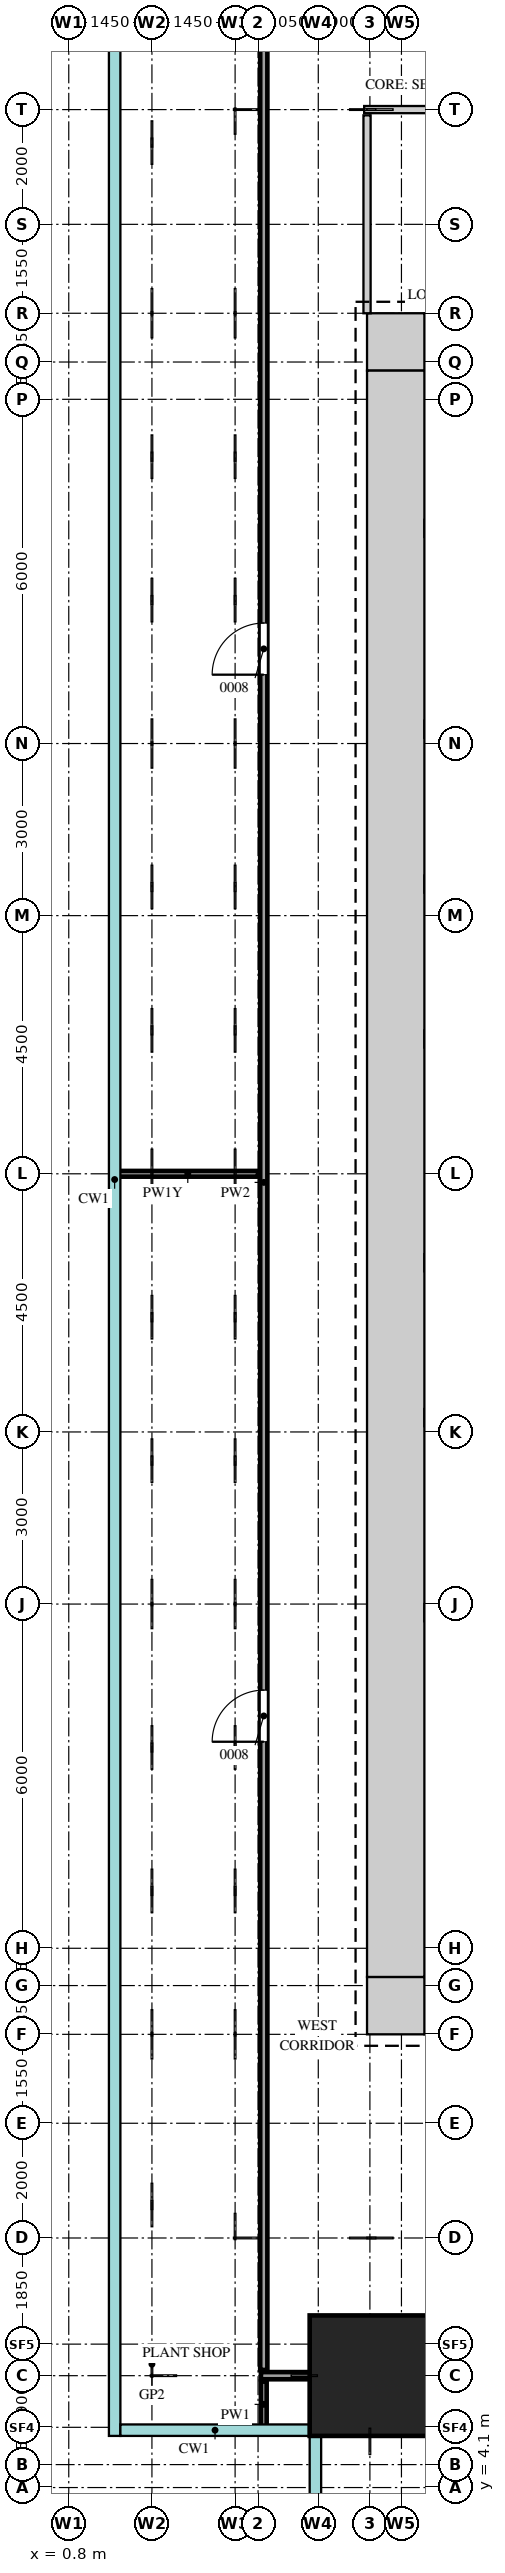
"""IFC4 building model, lengths in metres.
Left out: names, types, materials, properties, quantities, classifications, styles, units other than length and angle.
Written with IfcOpenShell. Run it as: python <this file> out.ifc"""

import sys

from ifc_helpers import new_model, si_unit, direction, frame, frame_2d, origin, origin_2d, place, context, subcontext, project, spatial, rectangle, extrude, source, transform, mapped, element, fill, save


model = new_model("IFC4")
c1 = context("Model", 3, precision=1e-05, world=origin(), true_north=direction((0.0, 1.0)))
c2 = subcontext(c1, "Body", "Model", "MODEL_VIEW")
j1 = project(units=[si_unit("LENGTHUNIT", "METRE"), si_unit("PLANEANGLEUNIT", "RADIAN")], contexts=[c1])
p1 = place(None, origin())
s1 = spatial("IfcSite", under=j1, at=p1, CompositionType="ELEMENT")
p2 = place(p1, origin())
s2 = spatial("IfcBuilding", under=s1, at=p2, CompositionType="ELEMENT")
p3 = place(p2, frame((0.0, 0.0, 158.7)))
s3 = spatial("IfcBuildingStorey", under=s2, at=p3, CompositionType="ELEMENT", Elevation=158.7)
m1 = source(origin(), c2, "Body", "SweptSolid", [
    extrude(rectangle(XDim=1.0, YDim=1.0, at=frame_2d((0.5, 0.0))), origin(), (0.0, 0.0, 1.0), 5.75),
])
for number, where, z_axis, x_axis in (
    (1, (6.0, 41.5, 0.0), (0.0, 0.0, 1.0), (1.0, 0.0, 0.0)),
    (2, (6.0, 12.5, 0.0), (0.0, 0.0, 1.0), (1.0, 0.0, 0.0)),
):
    element("IfcWall", number, at=place(p3, frame(where, z_axis=z_axis, x_axis=x_axis)), inside=s3, PredefinedType="SHEAR", context=c2, shape_type="MappedRepresentation", body=[
        mapped(m1, transform((0.0, 0.0, 0.0))),
    ])
m2 = source(origin(), c2, "Body", "SweptSolid", [
    extrude(rectangle(XDim=28.0, YDim=1.0, at=frame_2d((14.0, 0.0))), origin(), (0.0, 0.0, 1.0), 5.75),
])
p4 = place(p3, frame((6.5, 13.0, 0.0), z_axis=(0.0, 0.0, 1.0), x_axis=(0.0, 1.0, 0.0)))
e3 = element("IfcWall", 3, at=p4, inside=s3, PredefinedType="SHEAR", context=c2, shape_type="MappedRepresentation", body=[
    mapped(m2, transform((0.0, 0.0, 0.0))),
])
m3 = source(origin(), c2, "Body", "SweptSolid", [
    extrude(rectangle(XDim=2.1, YDim=2.1, at=origin_2d()), origin(), (0.0, 0.0, 1.0), 6.0),
])
p5 = place(p3, frame((6.05, 6.05, 0.0), z_axis=(0.0, 0.0, 1.0), x_axis=(1.0, 0.0, 0.0)))
e4 = element("IfcColumn", 4, at=p5, inside=s3, PredefinedType="COLUMN", context=c2, shape_type="MappedRepresentation", body=[
    mapped(m3, transform((0.0, 0.0, 0.0))),
])
m4 = source(origin(), c2, "Body", "SweptSolid", [
    extrude(rectangle(XDim=0.8, YDim=0.1, at=frame_2d((0.4, 0.0))), origin(), (0.0, 0.0, 1.0), 5.75),
])
p6 = place(p3, frame((4.2, 5.15, 0.0), z_axis=(0.0, 0.0, 1.0), x_axis=(0.0, 1.0, 0.0)))
e5 = element("IfcWall", 5, at=p6, inside=s3, PredefinedType="PARTITIONING", context=c2, shape_type="MappedRepresentation", body=[
    mapped(m4, transform((0.0, 0.0, 0.0))),
])
m5 = source(origin(), c2, "Body", "SweptSolid", [
    extrude(rectangle(XDim=20.4, YDim=0.125, at=frame_2d((10.2, 0.0))), origin(), (0.0, 0.0, 1.0), 5.75),
])
p7 = place(p3, frame((4.15, 6.05, 0.0), z_axis=(0.0, 0.0, 1.0), x_axis=(1.0, 0.0, 0.0)))
e6 = element("IfcWall", 6, at=p7, inside=s3, PredefinedType="PARTITIONING", context=c2, shape_type="MappedRepresentation", body=[
    mapped(m5, transform((0.0, 0.0, 0.0))),
])
m6 = source(origin(), c2, "Body", "SweptSolid", [
    extrude(rectangle(XDim=0.9, YDim=2.1, at=frame_2d((0.45, 1.05))), frame((0.0, 0.073, 0.0), z_axis=(0.0, -1.0, 0.0), x_axis=(1.0, 0.0, 0.0)), (0.0, 0.0, 1.0), 0.145),
])
p8 = place(p7, frame((4.5, 0.0, 0.0)))
e7 = element("IfcOpeningElement", 7, at=p8, cuts=e6, PredefinedType="OPENING", context=c2, shape_type="MappedRepresentation", body=[
    mapped(m6, transform((0.0, 0.0, 0.0))),
])
p9 = place(p7, frame((14.85, 0.0, 0.0)))
e8 = element("IfcOpeningElement", 8, at=p9, cuts=e6, PredefinedType="OPENING", context=c2, shape_type="MappedRepresentation", body=[
    mapped(m6, transform((0.0, 0.0, 0.0))),
])
m7 = source(origin(), c2, "Body", "SweptSolid", [
    extrude(rectangle(XDim=41.8, YDim=0.125, at=frame_2d((20.9, 0.0))), origin(), (0.0, 0.0, 1.0), 5.75),
])
p10 = place(p3, frame((4.2, 6.15, 0.0), z_axis=(0.0, 0.0, 1.0), x_axis=(0.0, 1.0, 0.0)))
e9 = element("IfcWall", 9, at=p10, inside=s3, PredefinedType="PARTITIONING", context=c2, shape_type="MappedRepresentation", body=[
    mapped(m7, transform((0.0, 0.0, 0.0))),
])
p11 = place(p10, frame((10.95, 0.0, 0.0)))
e10 = element("IfcOpeningElement", 10, at=p11, cuts=e9, PredefinedType="OPENING", context=c2, shape_type="MappedRepresentation", body=[
    mapped(m6, transform((0.0, 0.0, 0.0))),
])
p12 = place(p10, frame((29.55, 0.0, 0.0)))
e11 = element("IfcOpeningElement", 11, at=p12, cuts=e9, PredefinedType="OPENING", context=c2, shape_type="MappedRepresentation", body=[
    mapped(m6, transform((0.0, 0.0, 0.0))),
])
m8 = source(origin(), c2, "Body", "SweptSolid", [
    extrude(rectangle(XDim=2.45, YDim=0.1, at=frame_2d((1.225, 0.0))), origin(), (0.0, 0.0, 1.0), 2.85),
])
p13 = place(p3, frame((1.65, 27.0, 0.0), z_axis=(0.0, 0.0, 1.0), x_axis=(1.0, 0.0, 0.0)))
e12 = element("IfcWall", 12, at=p13, inside=s3, PredefinedType="PARTITIONING", context=c2, shape_type="MappedRepresentation", body=[
    mapped(m8, transform((0.0, 0.0, 0.0))),
])
m9 = source(origin(), c2, "Body", "SweptSolid", [
    extrude(rectangle(XDim=3.45, YDim=0.125, at=frame_2d((1.725, 0.0))), origin(), (0.0, 0.0, 1.0), 5.75),
])
p14 = place(p3, frame((6.0, 42.0, 0.0), z_axis=(0.0, 0.0, 1.0), x_axis=(0.0, 1.0, 0.0)))
e13 = element("IfcWall", 13, at=p14, inside=s3, PredefinedType="PARTITIONING", context=c2, shape_type="MappedRepresentation", body=[
    mapped(m9, transform((0.0, 0.0, 0.0))),
])
m10 = source(origin(), c2, "Body", "SweptSolid", [
    extrude(rectangle(XDim=7.95, YDim=0.125, at=frame_2d((3.975, 0.0))), origin(), (0.0, 0.0, 1.0), 5.75),
])
p15 = place(p3, frame((5.95, 45.55, 0.0), z_axis=(0.0, 0.0, 1.0), x_axis=(1.0, 0.0, 0.0)))
e14 = element("IfcWall", 14, at=p15, inside=s3, PredefinedType="PARTITIONING", context=c2, shape_type="MappedRepresentation", body=[
    mapped(m10, transform((0.0, 0.0, 0.0))),
])
p16 = place(p15, frame((3.55, 0.0, 0.0)))
e15 = element("IfcOpeningElement", 15, at=p16, cuts=e14, PredefinedType="OPENING", context=c2, shape_type="MappedRepresentation", body=[
    mapped(m6, transform((0.0, 0.0, 0.0))),
])
m11 = source(origin(), c2, "Body", "SweptSolid", [
    extrude(rectangle(XDim=0.9, YDim=2.1, at=frame_2d((0.45, 1.05))), frame((0.0, 0.025, 0.0), z_axis=(0.0, -1.0, 0.0), x_axis=(1.0, 0.0, 0.0)), (0.0, 0.0, 1.0), 0.05),
])
p17 = place(p11, origin())
e16 = element("IfcDoor", 16, at=p17, inside=s3, OperationType="SINGLE_SWING_RIGHT", PredefinedType="DOOR", context=c2, shape_type="MappedRepresentation", body=[
    mapped(m11, transform((0.0, 0.0, 0.0))),
])
fill(e10, e16)
p18 = place(p12, origin())
e17 = element("IfcDoor", 17, at=p18, inside=s3, OperationType="SINGLE_SWING_RIGHT", PredefinedType="DOOR", context=c2, shape_type="MappedRepresentation", body=[
    mapped(m11, transform((0.0, 0.0, 0.0))),
])
fill(e11, e17)
save(model, sys.argv[1])
